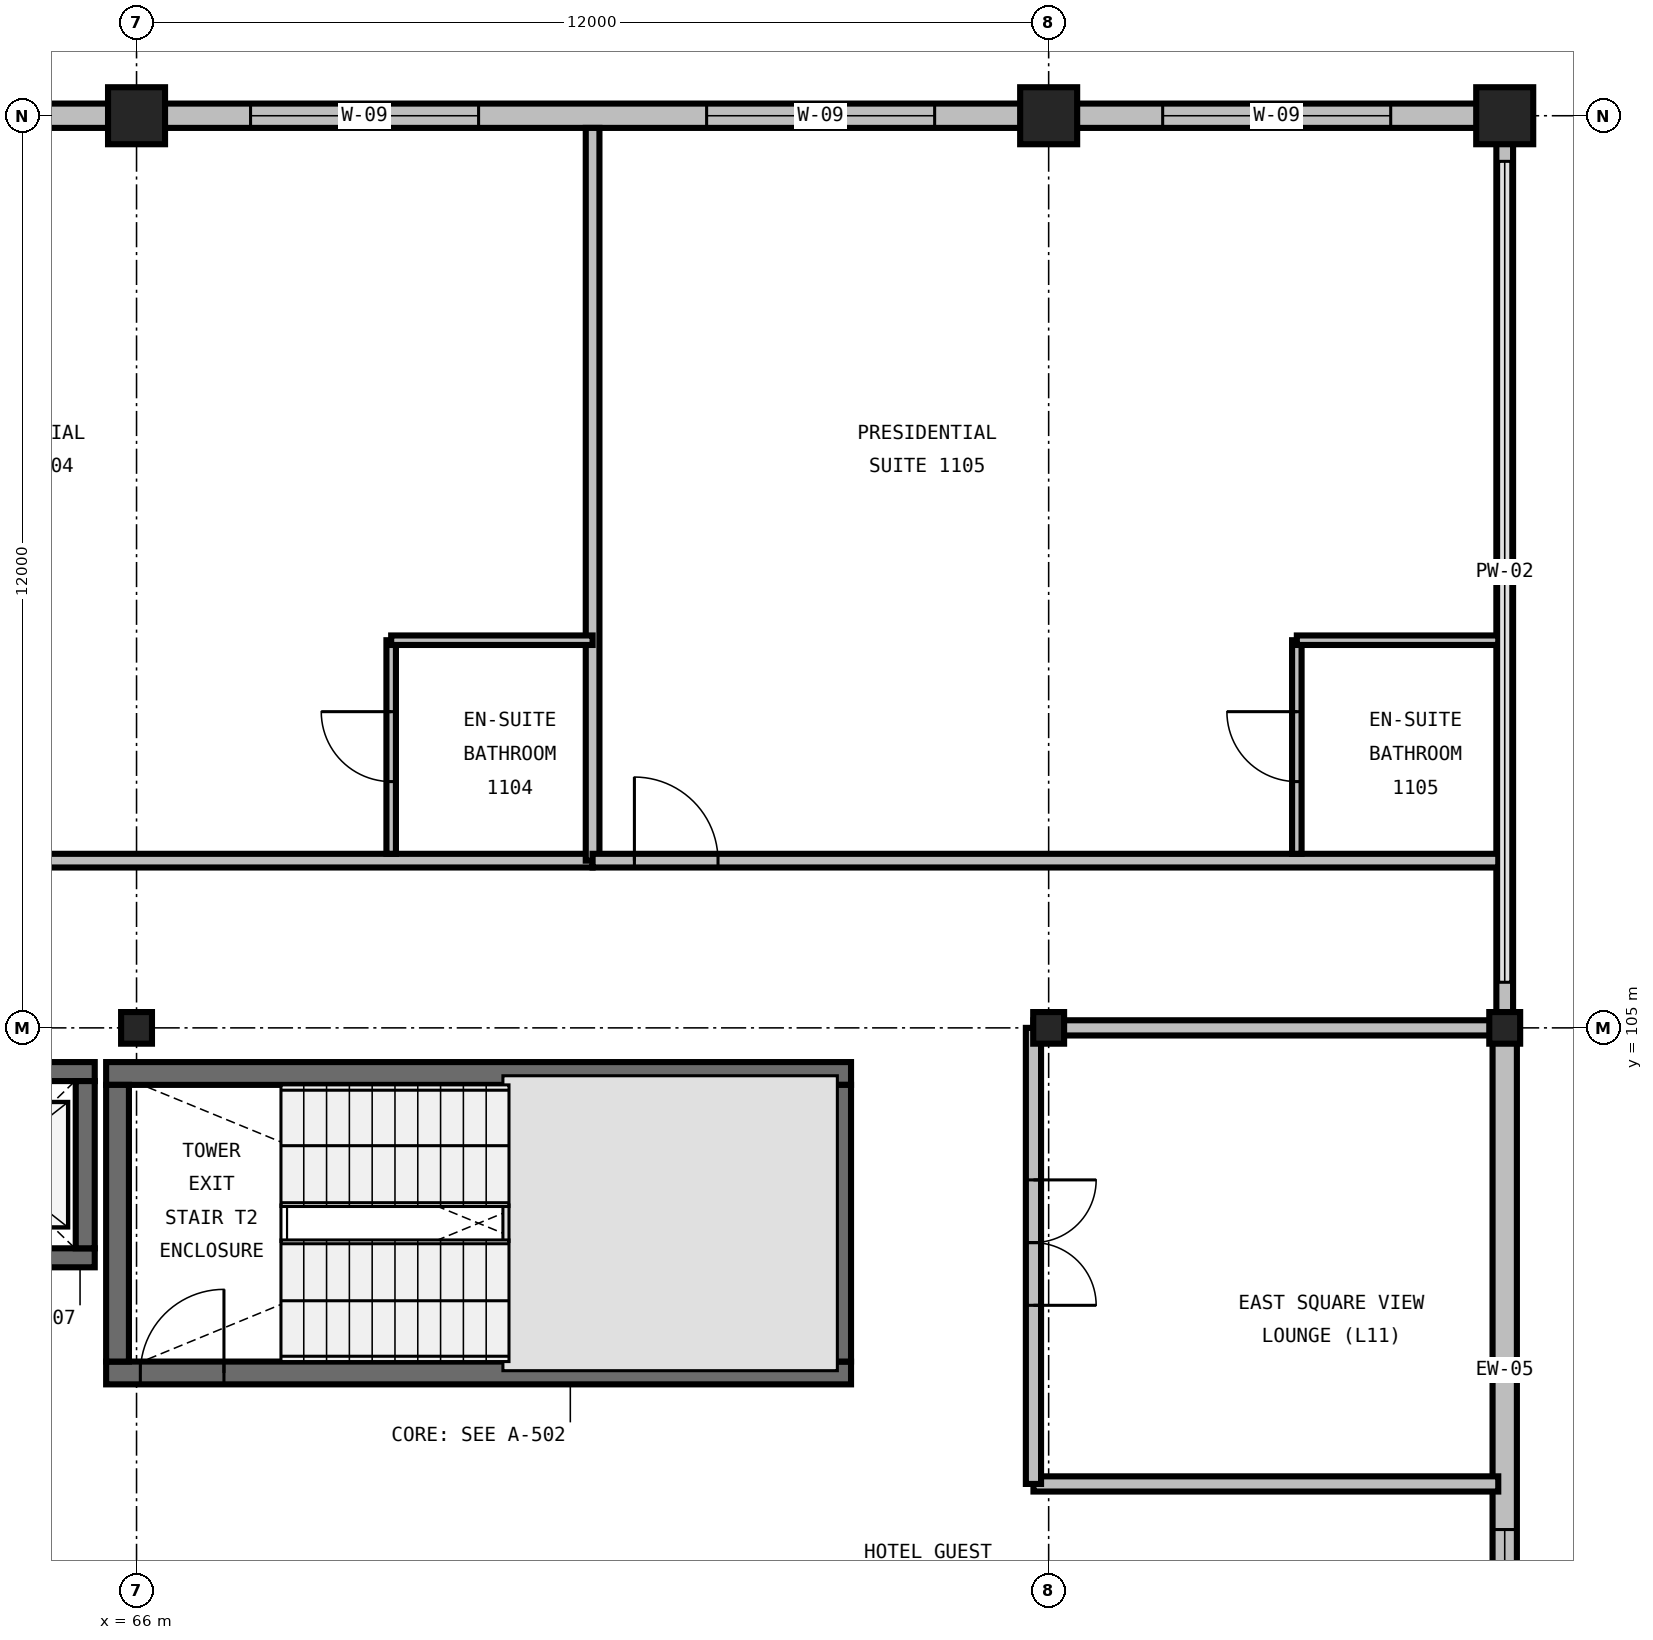
"""IFC4 building model, lengths in metres.
Left out: names, types, materials, properties, quantities, classifications, styles, units other than length and angle.
Written with IfcOpenShell. Run it as: python <this file> out.ifc"""

import sys

from ifc_helpers import new_model, si_unit, direction, frame, frame_2d, origin, origin_2d, place, context, subcontext, project, spatial, rectangle, i_section, extrude, element, fill, save


model = new_model("IFC4")
c1 = context("Model", 3, precision=1e-05, world=origin(), true_north=direction((0.0, 1.0)))
c2 = subcontext(c1, "Body", "Model", "MODEL_VIEW")
j1 = project(units=[si_unit("LENGTHUNIT", "METRE"), si_unit("PLANEANGLEUNIT", "RADIAN")], contexts=[c1])
p1 = place(None, origin())
s1 = spatial("IfcSite", under=j1, at=p1, CompositionType="ELEMENT")
p2 = place(p1, origin())
s2 = spatial("IfcBuilding", under=s1, at=p2, CompositionType="ELEMENT")
p3 = place(p2, frame((0.0, 0.0, 49.2)))
s3 = spatial("IfcBuildingStorey", under=s2, at=p3, CompositionType="ELEMENT", Elevation=49.2)
p4 = place(p3, frame((66.0, 105.0, 0.0), z_axis=(0.0, 0.0, 1.0), x_axis=(1.0, 0.0, 0.0)))
e1 = element("IfcColumn", 1, at=p4, inside=s3, PredefinedType="COLUMN", context=c2, shape_type="SweptSolid", body=[
    extrude(i_section(OverallWidth=0.406, OverallDepth=0.416, WebThickness=0.03, FlangeThickness=0.048, FilletRadius=0.031, at=origin_2d()), origin(), (0.0, 0.0, 1.0), 3.6),
])
p5 = place(p3, frame((66.0, 117.0, 0.0), z_axis=(0.0, 0.0, 1.0), x_axis=(1.0, 0.0, 0.0)))
e2 = element("IfcColumn", 2, at=p5, inside=s3, PredefinedType="COLUMN", context=c2, shape_type="SweptSolid", body=[
    extrude(rectangle(XDim=0.75, YDim=0.75, at=origin_2d()), origin(), (0.0, 0.0, 1.0), 3.6),
])
p6 = place(p3, frame((78.0, 105.0, 0.0), z_axis=(0.0, 0.0, 1.0), x_axis=(1.0, 0.0, 0.0)))
e3 = element("IfcColumn", 3, at=p6, inside=s3, PredefinedType="COLUMN", context=c2, shape_type="SweptSolid", body=[
    extrude(i_section(OverallWidth=0.406, OverallDepth=0.416, WebThickness=0.03, FlangeThickness=0.048, FilletRadius=0.031, at=origin_2d()), origin(), (0.0, 0.0, 1.0), 3.6),
])
p7 = place(p3, frame((78.0, 117.0, 0.0), z_axis=(0.0, 0.0, 1.0), x_axis=(1.0, 0.0, 0.0)))
e4 = element("IfcColumn", 4, at=p7, inside=s3, PredefinedType="COLUMN", context=c2, shape_type="SweptSolid", body=[
    extrude(rectangle(XDim=0.75, YDim=0.75, at=origin_2d()), origin(), (0.0, 0.0, 1.0), 3.6),
])
p8 = place(p3, frame((84.0, 105.0, 0.0), z_axis=(0.0, 0.0, 1.0), x_axis=(1.0, 0.0, 0.0)))
e5 = element("IfcColumn", 5, at=p8, inside=s3, PredefinedType="COLUMN", context=c2, shape_type="SweptSolid", body=[
    extrude(i_section(OverallWidth=0.406, OverallDepth=0.416, WebThickness=0.03, FlangeThickness=0.048, FilletRadius=0.031, at=origin_2d()), origin(), (0.0, 0.0, 1.0), 3.6),
])
p9 = place(p3, frame((84.0, 117.0, 0.0), z_axis=(0.0, 0.0, 1.0), x_axis=(1.0, 0.0, 0.0)))
e6 = element("IfcColumn", 6, at=p9, inside=s3, PredefinedType="COLUMN", context=c2, shape_type="SweptSolid", body=[
    extrude(rectangle(XDim=0.75, YDim=0.75, at=origin_2d()), origin(), (0.0, 0.0, 1.0), 3.6),
])
p10 = place(p3, frame((65.6, 100.46, 0.0), z_axis=(0.0, 0.0, 1.0), x_axis=(1.0, 0.0, 0.0)))
e7 = element("IfcWall", 7, at=p10, inside=s3, PredefinedType="SHEAR", context=c2, shape_type="SweptSolid", body=[
    extrude(rectangle(XDim=9.8, YDim=0.3, at=frame_2d((4.9, 0.0))), origin(), (0.0, 0.0, 1.0), 3.6),
])
p11 = place(p10, frame((0.45, 0.0, 0.0)))
e8 = element("IfcOpeningElement", 8, at=p11, cuts=e7, PredefinedType="OPENING", context=c2, shape_type="SweptSolid", body=[
    extrude(rectangle(XDim=1.1, YDim=2.2, at=frame_2d((0.55, 1.1))), frame((0.0, 0.165, 0.0), z_axis=(0.0, -1.0, 0.0), x_axis=(1.0, 0.0, 0.0)), (0.0, 0.0, 1.0), 0.33),
])
p12 = place(p3, frame((75.4, 104.4, 0.0), z_axis=(0.0, 0.0, 1.0), x_axis=(-1.0, 0.0, 0.0)))
e9 = element("IfcWall", 9, at=p12, inside=s3, PredefinedType="SHEAR", context=c2, shape_type="SweptSolid", body=[
    extrude(rectangle(XDim=9.8, YDim=0.3, at=frame_2d((4.9, 0.0))), origin(), (0.0, 0.0, 1.0), 3.6),
])
for number, where, z_axis, x_axis in (
    (10, (65.75, 104.25, 0.0), (0.0, 0.0, 1.0), (0.0, -1.0, 0.0)),
    (11, (75.25, 100.61, 0.0), (0.0, 0.0, 1.0), (0.0, 1.0, 0.0)),
):
    element("IfcWall", number, at=place(p3, frame(where, z_axis=z_axis, x_axis=x_axis)), inside=s3, PredefinedType="SHEAR", context=c2, shape_type="SweptSolid", body=[
        extrude(rectangle(XDim=3.64, YDim=0.3, at=frame_2d((1.82, 0.0))), origin(), (0.0, 0.0, 1.0), 3.6),
    ])
p13 = place(p3, frame((62.65, 101.975, 0.0), z_axis=(0.0, 0.0, 1.0), x_axis=(1.0, 0.0, 0.0)))
e12 = element("IfcWall", 12, at=p13, inside=s3, PredefinedType="SHEAR", context=c2, shape_type="SweptSolid", body=[
    extrude(rectangle(XDim=2.8, YDim=0.25, at=frame_2d((1.4, 0.0))), origin(), (0.0, 0.0, 1.0), 3.6),
])
p14 = place(p13, frame((0.8, 0.0, 0.0)))
e13 = element("IfcOpeningElement", 13, at=p14, cuts=e12, PredefinedType="OPENING", context=c2, shape_type="SweptSolid", body=[
    extrude(rectangle(XDim=1.2, YDim=2.2, at=frame_2d((0.6, 1.1))), frame((0.0, 0.14, 0.0), z_axis=(0.0, -1.0, 0.0), x_axis=(1.0, 0.0, 0.0)), (0.0, 0.0, 1.0), 0.28),
])
p15 = place(p3, frame((65.45, 104.425, 0.0), z_axis=(0.0, 0.0, 1.0), x_axis=(-1.0, 0.0, 0.0)))
e14 = element("IfcWall", 14, at=p15, inside=s3, PredefinedType="SHEAR", context=c2, shape_type="SweptSolid", body=[
    extrude(rectangle(XDim=2.8, YDim=0.25, at=frame_2d((1.4, 0.0))), origin(), (0.0, 0.0, 1.0), 3.6),
])
p16 = place(p3, frame((65.325, 102.1, 0.0), z_axis=(0.0, 0.0, 1.0), x_axis=(0.0, 1.0, 0.0)))
e15 = element("IfcWall", 15, at=p16, inside=s3, PredefinedType="SHEAR", context=c2, shape_type="SweptSolid", body=[
    extrude(rectangle(XDim=2.2, YDim=0.25, at=frame_2d((1.1, 0.0))), origin(), (0.0, 0.0, 1.0), 3.6),
])
p17 = place(p3, frame((66.0, 117.0, 0.0), z_axis=(0.0, 0.0, 1.0), x_axis=(-1.0, 0.0, 0.0)))
e16 = element("IfcWall", 16, at=p17, inside=s3, PredefinedType="STANDARD", context=c2, shape_type="SweptSolid", body=[
    extrude(rectangle(XDim=12.0, YDim=0.32, at=frame_2d((6.0, 0.0))), origin(), (0.0, 0.0, 1.0), 2.536),
])
p18 = place(p17, frame((1.5, 0.0, 0.7)))
e17 = element("IfcOpeningElement", 17, at=p18, cuts=e16, PredefinedType="OPENING", context=c2, shape_type="SweptSolid", body=[
    extrude(rectangle(XDim=3.0, YDim=1.71, at=frame_2d((1.5, 0.855))), frame((0.0, 0.175, 0.0), z_axis=(0.0, -1.0, 0.0), x_axis=(1.0, 0.0, 0.0)), (0.0, 0.0, 1.0), 0.35),
])
p19 = place(p17, frame((7.5, 0.0, 0.7)))
e18 = element("IfcOpeningElement", 18, at=p19, cuts=e16, PredefinedType="OPENING", context=c2, shape_type="SweptSolid", body=[
    extrude(rectangle(XDim=3.0, YDim=1.71, at=frame_2d((1.5, 0.855))), frame((0.0, 0.175, 0.0), z_axis=(0.0, -1.0, 0.0), x_axis=(1.0, 0.0, 0.0)), (0.0, 0.0, 1.0), 0.35),
])
p20 = place(p3, frame((78.0, 117.0, 0.0), z_axis=(0.0, 0.0, 1.0), x_axis=(-1.0, 0.0, 0.0)))
e19 = element("IfcWall", 19, at=p20, inside=s3, PredefinedType="STANDARD", context=c2, shape_type="SweptSolid", body=[
    extrude(rectangle(XDim=12.0, YDim=0.32, at=frame_2d((6.0, 0.0))), origin(), (0.0, 0.0, 1.0), 2.536),
])
p21 = place(p20, frame((1.5, 0.0, 0.7)))
e20 = element("IfcOpeningElement", 20, at=p21, cuts=e19, PredefinedType="OPENING", context=c2, shape_type="SweptSolid", body=[
    extrude(rectangle(XDim=3.0, YDim=1.71, at=frame_2d((1.5, 0.855))), frame((0.0, 0.175, 0.0), z_axis=(0.0, -1.0, 0.0), x_axis=(1.0, 0.0, 0.0)), (0.0, 0.0, 1.0), 0.35),
])
p22 = place(p20, frame((7.5, 0.0, 0.7)))
e21 = element("IfcOpeningElement", 21, at=p22, cuts=e19, PredefinedType="OPENING", context=c2, shape_type="SweptSolid", body=[
    extrude(rectangle(XDim=3.0, YDim=1.71, at=frame_2d((1.5, 0.855))), frame((0.0, 0.175, 0.0), z_axis=(0.0, -1.0, 0.0), x_axis=(1.0, 0.0, 0.0)), (0.0, 0.0, 1.0), 0.35),
])
p23 = place(p3, frame((84.0, 117.0, 0.0), z_axis=(0.0, 0.0, 1.0), x_axis=(-1.0, 0.0, 0.0)))
e22 = element("IfcWall", 22, at=p23, inside=s3, PredefinedType="STANDARD", context=c2, shape_type="SweptSolid", body=[
    extrude(rectangle(XDim=6.0, YDim=0.32, at=frame_2d((3.0, 0.0))), origin(), (0.0, 0.0, 1.0), 2.536),
])
p24 = place(p23, frame((1.5, 0.0, 0.7)))
e23 = element("IfcOpeningElement", 23, at=p24, cuts=e22, PredefinedType="OPENING", context=c2, shape_type="SweptSolid", body=[
    extrude(rectangle(XDim=3.0, YDim=1.71, at=frame_2d((1.5, 0.855))), frame((0.0, 0.175, 0.0), z_axis=(0.0, -1.0, 0.0), x_axis=(1.0, 0.0, 0.0)), (0.0, 0.0, 1.0), 0.35),
])
p25 = place(p3, frame((84.0, 96.0, 0.0), z_axis=(0.0, 0.0, 1.0), x_axis=(0.0, 1.0, 0.0)))
e24 = element("IfcWall", 24, at=p25, inside=s3, PredefinedType="STANDARD", context=c2, shape_type="SweptSolid", body=[
    extrude(rectangle(XDim=9.0, YDim=0.32, at=frame_2d((4.5, 0.0))), origin(), (0.0, 0.0, 1.0), 2.981),
])
p26 = place(p25, frame((0.6, 0.0, 0.85)))
e25 = element("IfcOpeningElement", 25, at=p26, cuts=e24, PredefinedType="OPENING", context=c2, shape_type="SweptSolid", body=[
    extrude(rectangle(XDim=1.8, YDim=1.5, at=frame_2d((0.9, 0.75))), frame((0.0, 0.175, 0.0), z_axis=(0.0, -1.0, 0.0), x_axis=(1.0, 0.0, 0.0)), (0.0, 0.0, 1.0), 0.35),
])
p27 = place(p3, frame((84.0, 105.0, 0.0), z_axis=(0.0, 0.0, 1.0), x_axis=(0.0, 1.0, 0.0)))
e26 = element("IfcWall", 26, at=p27, inside=s3, PredefinedType="PARAPET", context=c2, shape_type="SweptSolid", body=[
    extrude(rectangle(XDim=12.0, YDim=0.22, at=frame_2d((6.0, 0.0))), origin(), (0.0, 0.0, 1.0), 0.2),
])
p28 = place(p3, frame((60.0, 107.2, 0.0), z_axis=(0.0, 0.0, 1.0), x_axis=(1.0, 0.0, 0.0)))
e27 = element("IfcWall", 27, at=p28, inside=s3, PredefinedType="PARTITIONING", context=c2, shape_type="SweptSolid", body=[
    extrude(rectangle(XDim=12.0, YDim=0.18, at=frame_2d((6.0, 0.0))), origin(), (0.0, 0.0, 1.0), 3.29),
])
p29 = place(p28, frame((0.55, 0.0, 0.0)))
e28 = element("IfcOpeningElement", 28, at=p29, cuts=e27, PredefinedType="OPENING", context=c2, shape_type="SweptSolid", body=[
    extrude(rectangle(XDim=1.1, YDim=2.2, at=frame_2d((0.55, 1.1))), frame((0.0, 0.105, 0.0), z_axis=(0.0, -1.0, 0.0), x_axis=(1.0, 0.0, 0.0)), (0.0, 0.0, 1.0), 0.21),
])
p30 = place(p3, frame((72.0, 107.2, 0.0), z_axis=(0.0, 0.0, 1.0), x_axis=(0.0, 1.0, 0.0)))
e29 = element("IfcWall", 29, at=p30, inside=s3, PredefinedType="PARTITIONING", context=c2, shape_type="SweptSolid", body=[
    extrude(rectangle(XDim=9.64, YDim=0.18, at=frame_2d((4.82, 0.0))), origin(), (0.0, 0.0, 1.0), 3.29),
])
p31 = place(p3, frame((69.35, 107.29, 0.0), z_axis=(0.0, 0.0, 1.0), x_axis=(0.0, 1.0, 0.0)))
e30 = element("IfcWall", 30, at=p31, inside=s3, PredefinedType="PARTITIONING", context=c2, shape_type="SweptSolid", body=[
    extrude(rectangle(XDim=2.81, YDim=0.125, at=frame_2d((1.405, 0.0))), origin(), (0.0, 0.0, 1.0), 3.29),
])
p32 = place(p31, frame((0.95, 0.0, 0.0)))
e31 = element("IfcOpeningElement", 31, at=p32, cuts=e30, PredefinedType="OPENING", context=c2, shape_type="SweptSolid", body=[
    extrude(rectangle(XDim=0.92, YDim=2.1, at=frame_2d((0.46, 1.05))), frame((0.0, 0.077, 0.0), z_axis=(0.0, -1.0, 0.0), x_axis=(1.0, 0.0, 0.0)), (0.0, 0.0, 1.0), 0.155),
])
p33 = place(p3, frame((69.35, 110.1, 0.0), z_axis=(0.0, 0.0, 1.0), x_axis=(1.0, 0.0, 0.0)))
e32 = element("IfcWall", 32, at=p33, inside=s3, PredefinedType="PARTITIONING", context=c2, shape_type="SweptSolid", body=[
    extrude(rectangle(XDim=2.65, YDim=0.125, at=frame_2d((1.325, 0.0))), origin(), (0.0, 0.0, 1.0), 3.29),
])
p34 = place(p3, frame((72.0, 107.2, 0.0), z_axis=(0.0, 0.0, 1.0), x_axis=(1.0, 0.0, 0.0)))
e33 = element("IfcWall", 33, at=p34, inside=s3, PredefinedType="PARTITIONING", context=c2, shape_type="SweptSolid", body=[
    extrude(rectangle(XDim=11.915, YDim=0.18, at=frame_2d((5.957, 0.0))), origin(), (0.0, 0.0, 1.0), 3.29),
])
p35 = place(p34, frame((0.55, 0.0, 0.0)))
e34 = element("IfcOpeningElement", 34, at=p35, cuts=e33, PredefinedType="OPENING", context=c2, shape_type="SweptSolid", body=[
    extrude(rectangle(XDim=1.1, YDim=2.2, at=frame_2d((0.55, 1.1))), frame((0.0, 0.105, 0.0), z_axis=(0.0, -1.0, 0.0), x_axis=(1.0, 0.0, 0.0)), (0.0, 0.0, 1.0), 0.21),
])
p36 = place(p3, frame((81.265, 107.29, 0.0), z_axis=(0.0, 0.0, 1.0), x_axis=(0.0, 1.0, 0.0)))
e35 = element("IfcWall", 35, at=p36, inside=s3, PredefinedType="PARTITIONING", context=c2, shape_type="SweptSolid", body=[
    extrude(rectangle(XDim=2.81, YDim=0.125, at=frame_2d((1.405, 0.0))), origin(), (0.0, 0.0, 1.0), 3.29),
])
p37 = place(p36, frame((0.95, 0.0, 0.0)))
e36 = element("IfcOpeningElement", 36, at=p37, cuts=e35, PredefinedType="OPENING", context=c2, shape_type="SweptSolid", body=[
    extrude(rectangle(XDim=0.92, YDim=2.1, at=frame_2d((0.46, 1.05))), frame((0.0, 0.077, 0.0), z_axis=(0.0, -1.0, 0.0), x_axis=(1.0, 0.0, 0.0)), (0.0, 0.0, 1.0), 0.155),
])
p38 = place(p3, frame((81.265, 110.1, 0.0), z_axis=(0.0, 0.0, 1.0), x_axis=(1.0, 0.0, 0.0)))
e37 = element("IfcWall", 37, at=p38, inside=s3, PredefinedType="PARTITIONING", context=c2, shape_type="SweptSolid", body=[
    extrude(rectangle(XDim=2.65, YDim=0.125, at=frame_2d((1.325, 0.0))), origin(), (0.0, 0.0, 1.0), 3.29),
])
p39 = place(p3, frame((77.8, 99.0, 0.0), z_axis=(0.0, 0.0, 1.0), x_axis=(1.0, 0.0, 0.0)))
e38 = element("IfcWall", 38, at=p39, inside=s3, PredefinedType="PARTITIONING", context=c2, shape_type="SweptSolid", body=[
    extrude(rectangle(XDim=6.115, YDim=0.2, at=frame_2d((3.057, 0.0))), origin(), (0.0, 0.0, 1.0), 3.29),
])
p40 = place(p3, frame((83.915, 105.0, 0.0), z_axis=(0.0, 0.0, 1.0), x_axis=(-1.0, 0.0, 0.0)))
e39 = element("IfcWall", 39, at=p40, inside=s3, PredefinedType="PARTITIONING", context=c2, shape_type="SweptSolid", body=[
    extrude(rectangle(XDim=6.115, YDim=0.2, at=frame_2d((3.057, 0.0))), origin(), (0.0, 0.0, 1.0), 2.736),
])
p41 = place(p3, frame((77.8, 105.0, 0.0), z_axis=(0.0, 0.0, 1.0), x_axis=(0.0, -1.0, 0.0)))
e40 = element("IfcWall", 40, at=p41, inside=s3, PredefinedType="PARTITIONING", context=c2, shape_type="SweptSolid", body=[
    extrude(rectangle(XDim=6.0, YDim=0.2, at=frame_2d((3.0, 0.0))), origin(), (0.0, 0.0, 1.0), 3.29),
])
p42 = place(p41, frame((2.0, 0.0, 0.0)))
e41 = element("IfcOpeningElement", 41, at=p42, cuts=e40, PredefinedType="OPENING", context=c2, shape_type="SweptSolid", body=[
    extrude(rectangle(XDim=1.65, YDim=2.25, at=frame_2d((0.825, 1.125))), frame((0.0, 0.115, 0.0), z_axis=(0.0, -1.0, 0.0), x_axis=(1.0, 0.0, 0.0)), (0.0, 0.0, 1.0), 0.23),
])
p43 = place(p11, origin())
e42 = element("IfcDoor", 42, at=p43, inside=s3, OperationType="SINGLE_SWING_RIGHT", PredefinedType="DOOR", context=c2, shape_type="SweptSolid", body=[
    extrude(rectangle(XDim=1.1, YDim=2.2, at=frame_2d((0.55, 1.1))), frame((0.0, 0.025, 0.0), z_axis=(0.0, -1.0, 0.0), x_axis=(1.0, 0.0, 0.0)), (0.0, 0.0, 1.0), 0.05),
])
fill(e8, e42)
p44 = place(p21, origin())
e43 = element("IfcWindow", 43, at=p44, inside=s3, PartitioningType="TRIPLE_PANEL_VERTICAL", PredefinedType="WINDOW", context=c2, shape_type="SweptSolid", body=[
    extrude(rectangle(XDim=3.0, YDim=1.71, at=frame_2d((1.5, 0.855))), frame((0.0, 0.03, 0.0), z_axis=(0.0, -1.0, 0.0), x_axis=(1.0, 0.0, 0.0)), (0.0, 0.0, 1.0), 0.06),
])
fill(e20, e43)
p45 = place(p22, origin())
e44 = element("IfcWindow", 44, at=p45, inside=s3, PartitioningType="TRIPLE_PANEL_VERTICAL", PredefinedType="WINDOW", context=c2, shape_type="SweptSolid", body=[
    extrude(rectangle(XDim=3.0, YDim=1.71, at=frame_2d((1.5, 0.855))), frame((0.0, 0.03, 0.0), z_axis=(0.0, -1.0, 0.0), x_axis=(1.0, 0.0, 0.0)), (0.0, 0.0, 1.0), 0.06),
])
fill(e21, e44)
p46 = place(p24, origin())
e45 = element("IfcWindow", 45, at=p46, inside=s3, PartitioningType="TRIPLE_PANEL_VERTICAL", PredefinedType="WINDOW", context=c2, shape_type="SweptSolid", body=[
    extrude(rectangle(XDim=3.0, YDim=1.71, at=frame_2d((1.5, 0.855))), frame((0.0, 0.03, 0.0), z_axis=(0.0, -1.0, 0.0), x_axis=(1.0, 0.0, 0.0)), (0.0, 0.0, 1.0), 0.06),
])
fill(e23, e45)
p47 = place(p26, origin())
e46 = element("IfcWindow", 46, at=p47, inside=s3, PartitioningType="SINGLE_PANEL", PredefinedType="WINDOW", context=c2, shape_type="SweptSolid", body=[
    extrude(rectangle(XDim=1.8, YDim=1.5, at=frame_2d((0.9, 0.75))), frame((0.0, 0.03, 0.0), z_axis=(0.0, -1.0, 0.0), x_axis=(1.0, 0.0, 0.0)), (0.0, 0.0, 1.0), 0.06),
])
fill(e25, e46)
p48 = place(p32, origin())
e47 = element("IfcDoor", 47, at=p48, inside=s3, OperationType="SINGLE_SWING_RIGHT", PredefinedType="DOOR", context=c2, shape_type="SweptSolid", body=[
    extrude(rectangle(XDim=0.92, YDim=2.1, at=frame_2d((0.46, 1.05))), frame((0.0, 0.025, 0.0), z_axis=(0.0, -1.0, 0.0), x_axis=(1.0, 0.0, 0.0)), (0.0, 0.0, 1.0), 0.05),
])
fill(e31, e47)
p49 = place(p35, origin())
e48 = element("IfcDoor", 48, at=p49, inside=s3, OperationType="SINGLE_SWING_LEFT", PredefinedType="DOOR", context=c2, shape_type="SweptSolid", body=[
    extrude(rectangle(XDim=1.1, YDim=2.2, at=frame_2d((0.55, 1.1))), frame((0.0, 0.025, 0.0), z_axis=(0.0, -1.0, 0.0), x_axis=(1.0, 0.0, 0.0)), (0.0, 0.0, 1.0), 0.05),
])
fill(e34, e48)
p50 = place(p37, origin())
e49 = element("IfcDoor", 49, at=p50, inside=s3, OperationType="SINGLE_SWING_RIGHT", PredefinedType="DOOR", context=c2, shape_type="SweptSolid", body=[
    extrude(rectangle(XDim=0.92, YDim=2.1, at=frame_2d((0.46, 1.05))), frame((0.0, 0.025, 0.0), z_axis=(0.0, -1.0, 0.0), x_axis=(1.0, 0.0, 0.0)), (0.0, 0.0, 1.0), 0.05),
])
fill(e36, e49)
p51 = place(p42, origin())
e50 = element("IfcDoor", 50, at=p51, inside=s3, OperationType="DOUBLE_DOOR_SINGLE_SWING", PredefinedType="DOOR", context=c2, shape_type="SweptSolid", body=[
    extrude(rectangle(XDim=1.65, YDim=2.25, at=frame_2d((0.825, 1.125))), frame((0.0, 0.025, 0.0), z_axis=(0.0, -1.0, 0.0), x_axis=(1.0, 0.0, 0.0)), (0.0, 0.0, 1.0), 0.05),
])
fill(e41, e50)
save(model, sys.argv[1])
